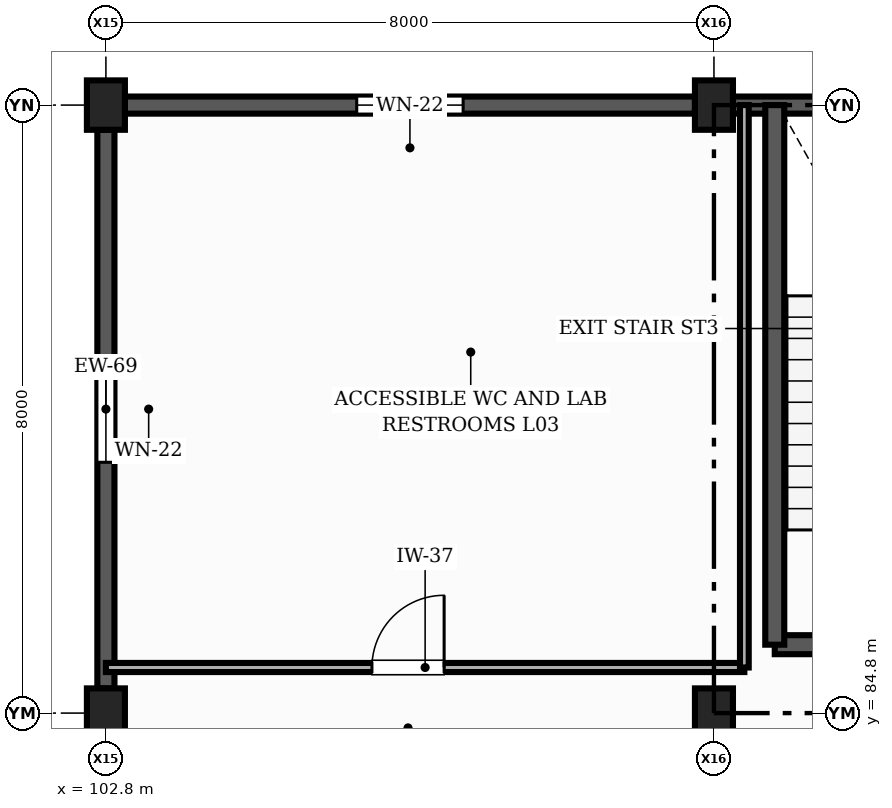
"""IFC4 building model, lengths in metres.
Left out: names, types, materials, properties, quantities, classifications, styles, units other than length and angle.
Written with IfcOpenShell. Run it as: python <this file> out.ifc"""

import sys

from ifc_helpers import new_model, si_unit, direction, frame, frame_2d, origin, origin_2d, place, context, subcontext, project, spatial, rectangle, extrude, element, fill, save


model = new_model("IFC4")
c1 = context("Model", 3, precision=1e-05, world=origin(), true_north=direction((0.0, 1.0)))
c2 = subcontext(c1, "Body", "Model", "MODEL_VIEW")
j1 = project(units=[si_unit("LENGTHUNIT", "METRE"), si_unit("PLANEANGLEUNIT", "RADIAN")], contexts=[c1])
p1 = place(None, origin())
s1 = spatial("IfcSite", under=j1, at=p1, CompositionType="ELEMENT")
p2 = place(p1, origin())
s2 = spatial("IfcBuilding", under=s1, at=p2, CompositionType="ELEMENT")
p3 = place(p2, frame((0.0, 0.0, 13.5)))
s3 = spatial("IfcBuildingStorey", under=s2, at=p3, CompositionType="ELEMENT", Elevation=13.5)
for number, where, z_axis, x_axis in (
    (1, (102.8, 84.8, 0.0), (0.0, 0.0, 1.0), (1.0, 0.0, 0.0)),
    (2, (102.8, 92.8, 0.0), (0.0, 0.0, 1.0), (1.0, 0.0, 0.0)),
    (3, (110.8, 84.8, 0.0), (0.0, 0.0, 1.0), (1.0, 0.0, 0.0)),
    (4, (110.8, 92.8, 0.0), (0.0, 0.0, 1.0), (1.0, 0.0, 0.0)),
):
    element("IfcColumn", number, at=place(p3, frame(where, z_axis=z_axis, x_axis=x_axis)), inside=s3, PredefinedType="COLUMN", context=c2, shape_type="SweptSolid", body=[
        extrude(rectangle(XDim=0.5, YDim=0.65, at=origin_2d()), origin(), (0.0, 0.0, 1.0), 4.5),
    ])
p4 = place(p3, frame((118.55, 92.8, 0.0), z_axis=(0.0, 0.0, 1.0), x_axis=(-1.0, 0.0, 0.0)))
e5 = element("IfcWall", 5, at=p4, inside=s3, PredefinedType="SOLIDWALL", context=c2, shape_type="SweptSolid", body=[
    extrude(rectangle(XDim=7.5, YDim=0.225, at=frame_2d((3.75, 0.0))), origin(), (0.0, 0.0, 1.0), 4.19),
])
p5 = place(p3, frame((110.55, 92.8, 0.0), z_axis=(0.0, 0.0, 1.0), x_axis=(-1.0, 0.0, 0.0)))
e6 = element("IfcWall", 6, at=p5, inside=s3, PredefinedType="SOLIDWALL", context=c2, shape_type="SweptSolid", body=[
    extrude(rectangle(XDim=7.5, YDim=0.225, at=frame_2d((3.75, 0.0))), origin(), (0.0, 0.0, 1.0), 3.54),
])
p6 = place(p5, frame((3.05, 0.0, 0.9)))
e7 = element("IfcOpeningElement", 7, at=p6, cuts=e6, PredefinedType="OPENING", context=c2, shape_type="SweptSolid", body=[
    extrude(rectangle(XDim=1.4, YDim=1.4, at=frame_2d((0.7, 0.7))), frame((0.0, 0.123, 0.0), z_axis=(0.0, -1.0, 0.0), x_axis=(1.0, 0.0, 0.0)), (0.0, 0.0, 1.0), 0.245),
])
p7 = place(p3, frame((102.8, 92.475, 0.0), z_axis=(0.0, 0.0, 1.0), x_axis=(0.0, -1.0, 0.0)))
e8 = element("IfcWall", 8, at=p7, inside=s3, PredefinedType="SOLIDWALL", context=c2, shape_type="SweptSolid", body=[
    extrude(rectangle(XDim=7.35, YDim=0.225, at=frame_2d((3.675, 0.0))), origin(), (0.0, 0.0, 1.0), 3.54),
])
p8 = place(p7, frame((2.975, 0.0, 0.9)))
e9 = element("IfcOpeningElement", 9, at=p8, cuts=e8, PredefinedType="OPENING", context=c2, shape_type="SweptSolid", body=[
    extrude(rectangle(XDim=1.4, YDim=1.4, at=frame_2d((0.7, 0.7))), frame((0.0, 0.123, 0.0), z_axis=(0.0, -1.0, 0.0), x_axis=(1.0, 0.0, 0.0)), (0.0, 0.0, 1.0), 0.245),
])
p9 = place(p3, frame((111.6, 85.7, 0.0), z_axis=(0.0, 0.0, 1.0), x_axis=(1.0, 0.0, 0.0)))
e10 = element("IfcWall", 10, at=p9, inside=s3, PredefinedType="SHEAR", context=c2, shape_type="SweptSolid", body=[
    extrude(rectangle(XDim=3.22, YDim=0.25, at=frame_2d((1.61, 0.0))), origin(), (0.0, 0.0, 1.0), 4.5),
])
p10 = place(p9, frame((1.035, 0.0, 0.0)))
e11 = element("IfcOpeningElement", 11, at=p10, cuts=e10, PredefinedType="OPENING", context=c2, shape_type="SweptSolid", body=[
    extrude(rectangle(XDim=1.15, YDim=2.15, at=frame_2d((0.575, 1.075))), frame((0.0, 0.135, 0.0), z_axis=(0.0, -1.0, 0.0), x_axis=(1.0, 0.0, 0.0)), (0.0, 0.0, 1.0), 0.27),
])
p11 = place(p3, frame((111.6, 92.8, 0.0), z_axis=(0.0, 0.0, 1.0), x_axis=(0.0, -1.0, 0.0)))
e12 = element("IfcWall", 12, at=p11, inside=s3, PredefinedType="SHEAR", context=c2, shape_type="SweptSolid", body=[
    extrude(rectangle(XDim=7.1, YDim=0.25, at=frame_2d((3.55, 0.0))), origin(), (0.0, 0.0, 1.0), 4.5),
])
p12 = place(p3, frame((102.8, 85.4, 0.0), z_axis=(0.0, 0.0, 1.0), x_axis=(1.0, 0.0, 0.0)))
e13 = element("IfcWall", 13, at=p12, inside=s3, PredefinedType="PARTITIONING", context=c2, shape_type="SweptSolid", body=[
    extrude(rectangle(XDim=8.4, YDim=0.12, at=frame_2d((4.2, 0.0))), origin(), (0.0, 0.0, 1.0), 3.525),
])
p13 = place(p12, frame((3.5, 0.0, 0.0)))
e14 = element("IfcOpeningElement", 14, at=p13, cuts=e13, PredefinedType="OPENING", context=c2, shape_type="SweptSolid", body=[
    extrude(rectangle(XDim=0.95, YDim=2.15, at=frame_2d((0.475, 1.075))), frame((0.0, 0.07, 0.0), z_axis=(0.0, -1.0, 0.0), x_axis=(1.0, 0.0, 0.0)), (0.0, 0.0, 1.0), 0.14),
])
p14 = place(p3, frame((111.2, 85.4, 0.0), z_axis=(0.0, 0.0, 1.0), x_axis=(0.0, 1.0, 0.0)))
e15 = element("IfcWall", 15, at=p14, inside=s3, PredefinedType="PARTITIONING", context=c2, shape_type="SweptSolid", body=[
    extrude(rectangle(XDim=7.4, YDim=0.115, at=frame_2d((3.7, 0.0))), origin(), (0.0, 0.0, 1.0), 4.19),
])
p15 = place(p6, origin())
e16 = element("IfcWindow", 16, at=p15, inside=s3, PartitioningType="SINGLE_PANEL", PredefinedType="WINDOW", context=c2, shape_type="SweptSolid", body=[
    extrude(rectangle(XDim=1.4, YDim=1.4, at=frame_2d((0.7, 0.7))), frame((0.0, 0.03, 0.0), z_axis=(0.0, -1.0, 0.0), x_axis=(1.0, 0.0, 0.0)), (0.0, 0.0, 1.0), 0.06),
])
fill(e7, e16)
p16 = place(p8, origin())
e17 = element("IfcWindow", 17, at=p16, inside=s3, PartitioningType="SINGLE_PANEL", PredefinedType="WINDOW", context=c2, shape_type="SweptSolid", body=[
    extrude(rectangle(XDim=1.4, YDim=1.4, at=frame_2d((0.7, 0.7))), frame((0.0, 0.03, 0.0), z_axis=(0.0, -1.0, 0.0), x_axis=(1.0, 0.0, 0.0)), (0.0, 0.0, 1.0), 0.06),
])
fill(e9, e17)
p17 = place(p13, origin())
e18 = element("IfcDoor", 18, at=p17, inside=s3, OperationType="SINGLE_SWING_RIGHT", PredefinedType="DOOR", context=c2, shape_type="SweptSolid", body=[
    extrude(rectangle(XDim=0.95, YDim=2.15, at=frame_2d((0.475, 1.075))), frame((0.0, 0.025, 0.0), z_axis=(0.0, -1.0, 0.0), x_axis=(1.0, 0.0, 0.0)), (0.0, 0.0, 1.0), 0.05),
])
fill(e14, e18)
save(model, sys.argv[1])
